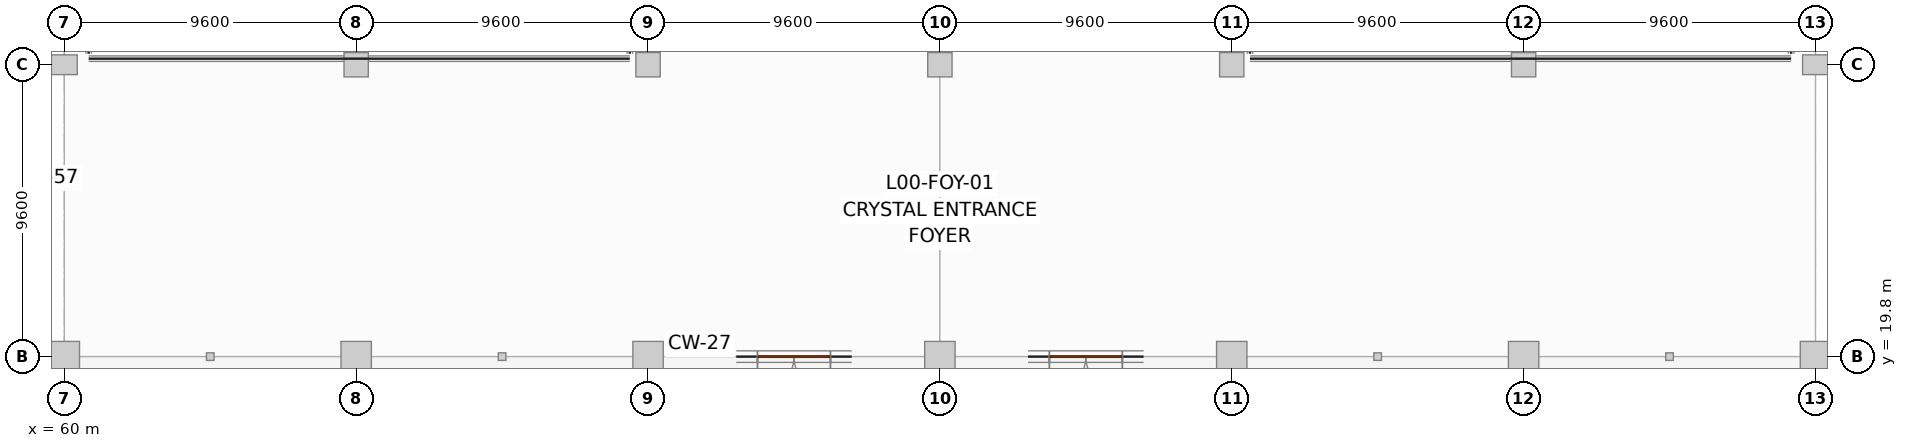
"""IFC4 building model, lengths in metres.
Left out: names, types, materials, properties, quantities, classifications, styles, units other than length and angle.
Written with IfcOpenShell. Run it as: python <this file> out.ifc"""

import sys

from ifc_helpers import new_model, si_unit, direction, frame, frame_2d, origin, origin_2d, place, context, subcontext, project, spatial, rectangle, hollow_rectangle, extrude, element, fill, save


model = new_model("IFC4")
c1 = context("Model", 3, precision=1e-05, world=origin(), true_north=direction((0.0, 1.0)))
c2 = subcontext(c1, "Body", "Model", "MODEL_VIEW")
j1 = project(units=[si_unit("LENGTHUNIT", "METRE"), si_unit("PLANEANGLEUNIT", "RADIAN")], contexts=[c1])
p1 = place(None, origin())
s1 = spatial("IfcSite", under=j1, at=p1, CompositionType="ELEMENT")
p2 = place(p1, origin())
s2 = spatial("IfcBuilding", under=s1, at=p2, CompositionType="ELEMENT")
p3 = place(p2, origin())
s3 = spatial("IfcBuildingStorey", under=s2, at=p3, CompositionType="ELEMENT", Elevation=0.0)
p4 = place(p3, frame((60.0, 19.8, 0.0), z_axis=(0.0, 0.0, 1.0), x_axis=(1.0, 0.0, 0.0)))
e1 = element("IfcColumn", 1, at=p4, inside=s3, PredefinedType="COLUMN", context=c2, shape_type="SweptSolid", body=[
    extrude(rectangle(XDim=1.0, YDim=1.0, at=origin_2d()), origin(), (0.0, 0.0, 1.0), 5.08),
])
p5 = place(p3, frame((60.0, 29.4, 0.0), z_axis=(0.0, 0.0, 1.0), x_axis=(1.0, 0.0, 0.0)))
e2 = element("IfcColumn", 2, at=p5, inside=s3, PredefinedType="COLUMN", context=c2, shape_type="SweptSolid", body=[
    extrude(rectangle(XDim=0.85, YDim=0.65, at=origin_2d()), origin(), (0.0, 0.0, 1.0), 5.08),
])
p6 = place(p3, frame((69.6, 19.8, 0.0), z_axis=(0.0, 0.0, 1.0), x_axis=(1.0, 0.0, 0.0)))
e3 = element("IfcColumn", 3, at=p6, inside=s3, PredefinedType="COLUMN", context=c2, shape_type="SweptSolid", body=[
    extrude(rectangle(XDim=1.0, YDim=1.0, at=origin_2d()), origin(), (0.0, 0.0, 1.0), 5.08),
])
p7 = place(p3, frame((69.6, 29.4, 0.0), z_axis=(0.0, 0.0, 1.0), x_axis=(1.0, 0.0, 0.0)))
e4 = element("IfcColumn", 4, at=p7, inside=s3, PredefinedType="COLUMN", context=c2, shape_type="SweptSolid", body=[
    extrude(rectangle(XDim=0.8, YDim=0.8, at=origin_2d()), origin(), (0.0, 0.0, 1.0), 5.08),
])
p8 = place(p3, frame((79.2, 19.8, 0.0), z_axis=(0.0, 0.0, 1.0), x_axis=(1.0, 0.0, 0.0)))
e5 = element("IfcColumn", 5, at=p8, inside=s3, PredefinedType="COLUMN", context=c2, shape_type="SweptSolid", body=[
    extrude(rectangle(XDim=1.0, YDim=1.0, at=origin_2d()), origin(), (0.0, 0.0, 1.0), 5.08),
])
p9 = place(p3, frame((79.2, 29.4, 0.0), z_axis=(0.0, 0.0, 1.0), x_axis=(1.0, 0.0, 0.0)))
e6 = element("IfcColumn", 6, at=p9, inside=s3, PredefinedType="COLUMN", context=c2, shape_type="SweptSolid", body=[
    extrude(rectangle(XDim=0.8, YDim=0.8, at=origin_2d()), origin(), (0.0, 0.0, 1.0), 5.08),
])
p10 = place(p3, frame((88.8, 19.8, 0.0), z_axis=(0.0, 0.0, 1.0), x_axis=(1.0, 0.0, 0.0)))
e7 = element("IfcColumn", 7, at=p10, inside=s3, PredefinedType="COLUMN", context=c2, shape_type="SweptSolid", body=[
    extrude(rectangle(XDim=1.0, YDim=1.0, at=origin_2d()), origin(), (0.0, 0.0, 1.0), 5.08),
])
p11 = place(p3, frame((88.8, 29.4, 0.0), z_axis=(0.0, 0.0, 1.0), x_axis=(1.0, 0.0, 0.0)))
e8 = element("IfcColumn", 8, at=p11, inside=s3, PredefinedType="COLUMN", context=c2, shape_type="SweptSolid", body=[
    extrude(rectangle(XDim=0.8, YDim=0.8, at=origin_2d()), origin(), (0.0, 0.0, 1.0), 5.08),
])
p12 = place(p3, frame((98.4, 19.8, 0.0), z_axis=(0.0, 0.0, 1.0), x_axis=(1.0, 0.0, 0.0)))
e9 = element("IfcColumn", 9, at=p12, inside=s3, PredefinedType="COLUMN", context=c2, shape_type="SweptSolid", body=[
    extrude(rectangle(XDim=1.0, YDim=1.0, at=origin_2d()), origin(), (0.0, 0.0, 1.0), 5.08),
])
p13 = place(p3, frame((98.4, 29.4, 0.0), z_axis=(0.0, 0.0, 1.0), x_axis=(1.0, 0.0, 0.0)))
e10 = element("IfcColumn", 10, at=p13, inside=s3, PredefinedType="COLUMN", context=c2, shape_type="SweptSolid", body=[
    extrude(rectangle(XDim=0.8, YDim=0.8, at=origin_2d()), origin(), (0.0, 0.0, 1.0), 5.08),
])
p14 = place(p3, frame((108.0, 19.8, 0.0), z_axis=(0.0, 0.0, 1.0), x_axis=(1.0, 0.0, 0.0)))
e11 = element("IfcColumn", 11, at=p14, inside=s3, PredefinedType="COLUMN", context=c2, shape_type="SweptSolid", body=[
    extrude(rectangle(XDim=1.0, YDim=1.0, at=origin_2d()), origin(), (0.0, 0.0, 1.0), 5.08),
])
p15 = place(p3, frame((108.0, 29.4, 0.0), z_axis=(0.0, 0.0, 1.0), x_axis=(1.0, 0.0, 0.0)))
e12 = element("IfcColumn", 12, at=p15, inside=s3, PredefinedType="COLUMN", context=c2, shape_type="SweptSolid", body=[
    extrude(rectangle(XDim=0.8, YDim=0.8, at=origin_2d()), origin(), (0.0, 0.0, 1.0), 5.08),
])
p16 = place(p3, frame((117.6, 19.8, 0.0), z_axis=(0.0, 0.0, 1.0), x_axis=(1.0, 0.0, 0.0)))
e13 = element("IfcColumn", 13, at=p16, inside=s3, PredefinedType="COLUMN", context=c2, shape_type="SweptSolid", body=[
    extrude(rectangle(XDim=1.0, YDim=1.0, at=origin_2d()), origin(), (0.0, 0.0, 1.0), 5.08),
])
p17 = place(p3, frame((117.6, 29.4, 0.0), z_axis=(0.0, 0.0, 1.0), x_axis=(1.0, 0.0, 0.0)))
e14 = element("IfcColumn", 14, at=p17, inside=s3, PredefinedType="COLUMN", context=c2, shape_type="SweptSolid", body=[
    extrude(rectangle(XDim=0.85, YDim=0.65, at=origin_2d()), origin(), (0.0, 0.0, 1.0), 5.08),
])
for number, where, z_axis, x_axis in (
    (15, (64.8, 19.8, 0.0), (0.0, 0.0, 1.0), (1.0, 0.0, 0.0)),
    (16, (74.4, 19.8, 0.0), (0.0, 0.0, 1.0), (1.0, 0.0, 0.0)),
    (17, (103.2, 19.8, 0.0), (0.0, 0.0, 1.0), (1.0, 0.0, 0.0)),
    (18, (112.8, 19.8, 0.0), (0.0, 0.0, 1.0), (1.0, 0.0, 0.0)),
):
    element("IfcColumn", number, at=place(p3, frame(where, z_axis=z_axis, x_axis=x_axis)), inside=s3, PredefinedType="COLUMN", context=c2, shape_type="SweptSolid", body=[
        extrude(hollow_rectangle(XDim=0.25, YDim=0.25, WallThickness=0.012, at=origin_2d()), origin(), (0.0, 0.0, 1.0), 5.08),
    ])
p18 = place(p3, frame((82.1, 19.8, 0.0), z_axis=(0.0, 0.0, 1.0), x_axis=(1.0, 0.0, 0.0)))
e19 = element("IfcWall", 19, at=p18, inside=s3, PredefinedType="SOLIDWALL", context=c2, shape_type="SweptSolid", body=[
    extrude(rectangle(XDim=3.8, YDim=0.38, at=frame_2d((1.9, 0.0))), origin(), (0.0, 0.0, 1.0), 4.28),
])
p19 = place(p18, frame((0.7, 0.0, 0.0)))
e20 = element("IfcOpeningElement", 20, at=p19, cuts=e19, PredefinedType="OPENING", context=c2, shape_type="SweptSolid", body=[
    extrude(rectangle(XDim=2.4, YDim=2.8, at=frame_2d((1.2, 1.4))), frame((0.0, 0.2, 0.0), z_axis=(0.0, -1.0, 0.0), x_axis=(1.0, 0.0, 0.0)), (0.0, 0.0, 1.0), 0.4),
])
p20 = place(p3, frame((91.7, 19.8, 0.0), z_axis=(0.0, 0.0, 1.0), x_axis=(1.0, 0.0, 0.0)))
e21 = element("IfcWall", 21, at=p20, inside=s3, PredefinedType="SOLIDWALL", context=c2, shape_type="SweptSolid", body=[
    extrude(rectangle(XDim=3.8, YDim=0.38, at=frame_2d((1.9, 0.0))), origin(), (0.0, 0.0, 1.0), 4.28),
])
p21 = place(p20, frame((0.7, 0.0, 0.0)))
e22 = element("IfcOpeningElement", 22, at=p21, cuts=e21, PredefinedType="OPENING", context=c2, shape_type="SweptSolid", body=[
    extrude(rectangle(XDim=2.4, YDim=2.8, at=frame_2d((1.2, 1.4))), frame((0.0, 0.2, 0.0), z_axis=(0.0, -1.0, 0.0), x_axis=(1.0, 0.0, 0.0)), (0.0, 0.0, 1.0), 0.4),
])
p22 = place(p3, frame((60.8, 29.6, 0.0), z_axis=(0.0, 0.0, 1.0), x_axis=(1.0, 0.0, 0.0)))
e23 = element("IfcWall", 23, at=p22, inside=s3, PredefinedType="PARTITIONING", context=c2, shape_type="SweptSolid", body=[
    extrude(rectangle(XDim=17.8, YDim=0.18, at=frame_2d((8.9, 0.0))), origin(), (0.0, 0.0, 1.0), 4.12),
])
p23 = place(p3, frame((60.8, 29.76, 0.0), z_axis=(0.0, 0.0, 1.0), x_axis=(0.0, 1.0, 0.0)))
e24 = element("IfcWall", 24, at=p23, inside=s3, PredefinedType="PARTITIONING", context=c2, shape_type="SweptSolid", body=[
    extrude(rectangle(XDim=27.68, YDim=0.18, at=frame_2d((13.84, 0.0))), origin(), (0.0, 0.0, 1.0), 4.12),
])
p24 = place(p3, frame((78.6, 29.76, 0.0), z_axis=(0.0, 0.0, 1.0), x_axis=(0.0, 1.0, 0.0)))
e25 = element("IfcWall", 25, at=p24, inside=s3, PredefinedType="PARTITIONING", context=c2, shape_type="SweptSolid", body=[
    extrude(rectangle(XDim=27.68, YDim=0.18, at=frame_2d((13.84, 0.0))), origin(), (0.0, 0.0, 1.0), 4.12),
])
p25 = place(p24, frame((12.94, 0.0, 0.0)))
e26 = element("IfcOpeningElement", 26, at=p25, cuts=e25, PredefinedType="OPENING", context=c2, shape_type="SweptSolid", body=[
    extrude(rectangle(XDim=1.8, YDim=2.4, at=frame_2d((0.9, 1.2))), frame((0.0, 0.1, 0.0), z_axis=(0.0, -1.0, 0.0), x_axis=(1.0, 0.0, 0.0)), (0.0, 0.0, 1.0), 0.2),
])
p26 = place(p3, frame((99.0, 29.6, 0.0), z_axis=(0.0, 0.0, 1.0), x_axis=(1.0, 0.0, 0.0)))
e27 = element("IfcWall", 27, at=p26, inside=s3, PredefinedType="PARTITIONING", context=c2, shape_type="SweptSolid", body=[
    extrude(rectangle(XDim=17.8, YDim=0.18, at=frame_2d((8.9, 0.0))), origin(), (0.0, 0.0, 1.0), 4.12),
])
p27 = place(p3, frame((99.0, 29.76, 0.0), z_axis=(0.0, 0.0, 1.0), x_axis=(0.0, 1.0, 0.0)))
e28 = element("IfcWall", 28, at=p27, inside=s3, PredefinedType="PARTITIONING", context=c2, shape_type="SweptSolid", body=[
    extrude(rectangle(XDim=21.68, YDim=0.18, at=frame_2d((10.84, 0.0))), origin(), (0.0, 0.0, 1.0), 4.12),
])
p28 = place(p27, frame((9.94, 0.0, 0.0)))
e29 = element("IfcOpeningElement", 29, at=p28, cuts=e28, PredefinedType="OPENING", context=c2, shape_type="SweptSolid", body=[
    extrude(rectangle(XDim=1.8, YDim=2.4, at=frame_2d((0.9, 1.2))), frame((0.0, 0.1, 0.0), z_axis=(0.0, -1.0, 0.0), x_axis=(1.0, 0.0, 0.0)), (0.0, 0.0, 1.0), 0.2),
])
p29 = place(p3, frame((116.8, 29.76, 0.0), z_axis=(0.0, 0.0, 1.0), x_axis=(0.0, 1.0, 0.0)))
e30 = element("IfcWall", 30, at=p29, inside=s3, PredefinedType="PARTITIONING", context=c2, shape_type="SweptSolid", body=[
    extrude(rectangle(XDim=21.68, YDim=0.18, at=frame_2d((10.84, 0.0))), origin(), (0.0, 0.0, 1.0), 4.12),
])
p30 = place(p19, frame((2.4, 0.0, 0.0), z_axis=(0.0, 0.0, 1.0), x_axis=(-1.0, 0.0, 0.0)))
e31 = element("IfcDoor", 31, at=p30, inside=s3, OperationType="DOUBLE_DOOR_SINGLE_SWING", PredefinedType="DOOR", context=c2, shape_type="SweptSolid", body=[
    extrude(rectangle(XDim=2.4, YDim=2.8, at=frame_2d((1.2, 1.4))), frame((0.0, 0.025, 0.0), z_axis=(0.0, -1.0, 0.0), x_axis=(1.0, 0.0, 0.0)), (0.0, 0.0, 1.0), 0.05),
])
fill(e20, e31)
p31 = place(p21, frame((2.4, 0.0, 0.0), z_axis=(0.0, 0.0, 1.0), x_axis=(-1.0, 0.0, 0.0)))
e32 = element("IfcDoor", 32, at=p31, inside=s3, OperationType="DOUBLE_DOOR_SINGLE_SWING", PredefinedType="DOOR", context=c2, shape_type="SweptSolid", body=[
    extrude(rectangle(XDim=2.4, YDim=2.8, at=frame_2d((1.2, 1.4))), frame((0.0, 0.025, 0.0), z_axis=(0.0, -1.0, 0.0), x_axis=(1.0, 0.0, 0.0)), (0.0, 0.0, 1.0), 0.05),
])
fill(e22, e32)
save(model, sys.argv[1])
